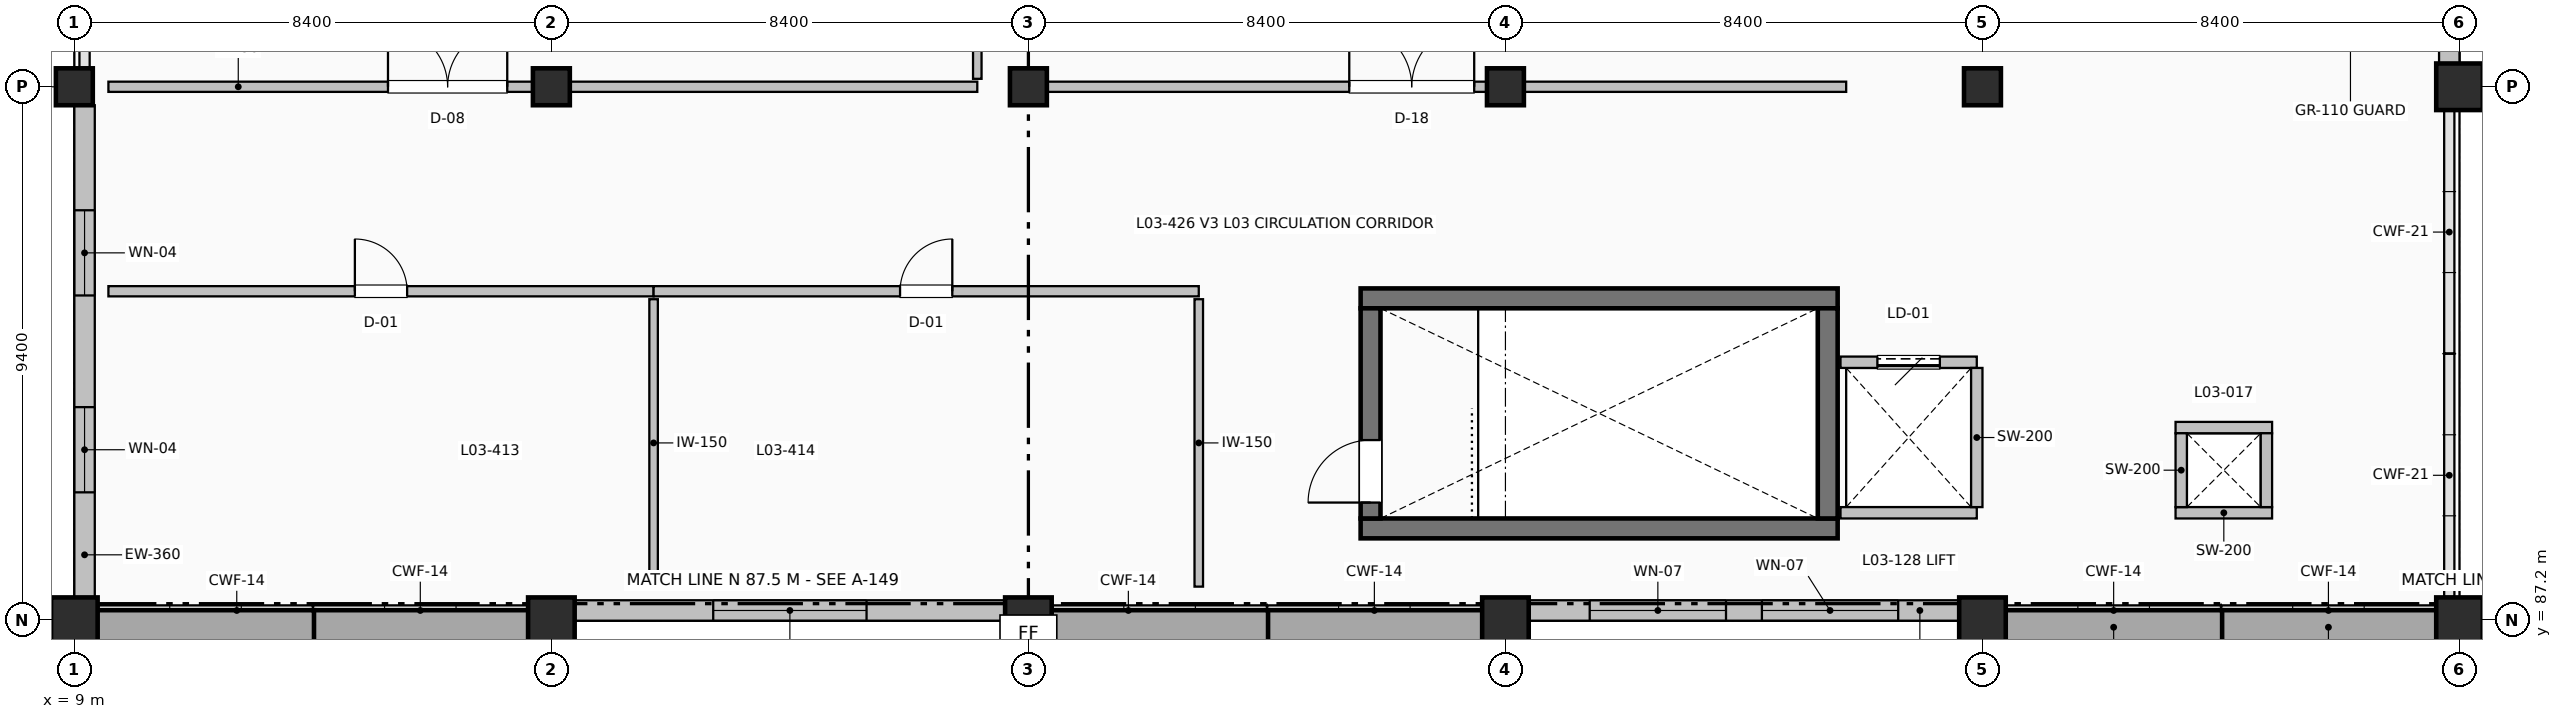
"""IFC4 building model, lengths in metres.
Left out: names, types, materials, properties, quantities, classifications, styles, units other than length and angle.
Written with IfcOpenShell. Run it as: python <this file> out.ifc"""

import sys

from ifc_helpers import new_model, si_unit, direction, frame, frame_2d, origin, origin_2d, place, context, subcontext, project, spatial, rectangle, extrude, element, fill, save


model = new_model("IFC4")
c1 = context("Model", 3, precision=1e-05, world=origin(), true_north=direction((0.0, 1.0)))
c2 = subcontext(c1, "Body", "Model", "MODEL_VIEW")
j1 = project(units=[si_unit("LENGTHUNIT", "METRE"), si_unit("PLANEANGLEUNIT", "RADIAN")], contexts=[c1])
p1 = place(None, origin())
s1 = spatial("IfcSite", under=j1, at=p1, CompositionType="ELEMENT")
p2 = place(p1, origin())
s2 = spatial("IfcBuilding", under=s1, at=p2, CompositionType="ELEMENT")
p3 = place(p2, frame((0.0, 0.0, 15.0)))
s3 = spatial("IfcBuildingStorey", under=s2, at=p3, CompositionType="ELEMENT", Elevation=15.0)
p4 = place(p3, frame((9.0, 87.2, 0.0), z_axis=(0.0, 0.0, 1.0), x_axis=(1.0, 0.0, 0.0)))
e1 = element("IfcColumn", 1, at=p4, inside=s3, PredefinedType="COLUMN", context=c2, shape_type="SweptSolid", body=[
    extrude(rectangle(XDim=0.82, YDim=0.82, at=origin_2d()), origin(), (0.0, 0.0, 1.0), 4.5),
])
p5 = place(p3, frame((9.0, 96.6, 0.0), z_axis=(0.0, 0.0, 1.0), x_axis=(1.0, 0.0, 0.0)))
e2 = element("IfcColumn", 2, at=p5, inside=s3, PredefinedType="COLUMN", context=c2, shape_type="SweptSolid", body=[
    extrude(rectangle(XDim=0.65, YDim=0.65, at=origin_2d()), origin(), (0.0, 0.0, 1.0), 4.5),
])
p6 = place(p3, frame((17.4, 87.2, 0.0), z_axis=(0.0, 0.0, 1.0), x_axis=(1.0, 0.0, 0.0)))
e3 = element("IfcColumn", 3, at=p6, inside=s3, PredefinedType="COLUMN", context=c2, shape_type="SweptSolid", body=[
    extrude(rectangle(XDim=0.82, YDim=0.82, at=origin_2d()), origin(), (0.0, 0.0, 1.0), 4.5),
])
p7 = place(p3, frame((17.4, 96.6, 0.0), z_axis=(0.0, 0.0, 1.0), x_axis=(1.0, 0.0, 0.0)))
e4 = element("IfcColumn", 4, at=p7, inside=s3, PredefinedType="COLUMN", context=c2, shape_type="SweptSolid", body=[
    extrude(rectangle(XDim=0.65, YDim=0.65, at=origin_2d()), origin(), (0.0, 0.0, 1.0), 4.5),
])
p8 = place(p3, frame((25.8, 87.2, 0.0), z_axis=(0.0, 0.0, 1.0), x_axis=(1.0, 0.0, 0.0)))
e5 = element("IfcColumn", 5, at=p8, inside=s3, PredefinedType="COLUMN", context=c2, shape_type="SweptSolid", body=[
    extrude(rectangle(XDim=0.82, YDim=0.82, at=origin_2d()), origin(), (0.0, 0.0, 1.0), 4.5),
])
p9 = place(p3, frame((25.8, 96.6, 0.0), z_axis=(0.0, 0.0, 1.0), x_axis=(1.0, 0.0, 0.0)))
e6 = element("IfcColumn", 6, at=p9, inside=s3, PredefinedType="COLUMN", context=c2, shape_type="SweptSolid", body=[
    extrude(rectangle(XDim=0.65, YDim=0.65, at=origin_2d()), origin(), (0.0, 0.0, 1.0), 4.5),
])
p10 = place(p3, frame((34.2, 87.2, 0.0), z_axis=(0.0, 0.0, 1.0), x_axis=(1.0, 0.0, 0.0)))
e7 = element("IfcColumn", 7, at=p10, inside=s3, PredefinedType="COLUMN", context=c2, shape_type="SweptSolid", body=[
    extrude(rectangle(XDim=0.82, YDim=0.82, at=origin_2d()), origin(), (0.0, 0.0, 1.0), 4.5),
])
p11 = place(p3, frame((34.2, 96.6, 0.0), z_axis=(0.0, 0.0, 1.0), x_axis=(1.0, 0.0, 0.0)))
e8 = element("IfcColumn", 8, at=p11, inside=s3, PredefinedType="COLUMN", context=c2, shape_type="SweptSolid", body=[
    extrude(rectangle(XDim=0.65, YDim=0.65, at=origin_2d()), origin(), (0.0, 0.0, 1.0), 4.5),
])
p12 = place(p3, frame((42.6, 87.2, 0.0), z_axis=(0.0, 0.0, 1.0), x_axis=(1.0, 0.0, 0.0)))
e9 = element("IfcColumn", 9, at=p12, inside=s3, PredefinedType="COLUMN", context=c2, shape_type="SweptSolid", body=[
    extrude(rectangle(XDim=0.82, YDim=0.82, at=origin_2d()), origin(), (0.0, 0.0, 1.0), 4.5),
])
p13 = place(p3, frame((42.6, 96.6, 0.0), z_axis=(0.0, 0.0, 1.0), x_axis=(1.0, 0.0, 0.0)))
e10 = element("IfcColumn", 10, at=p13, inside=s3, PredefinedType="COLUMN", context=c2, shape_type="SweptSolid", body=[
    extrude(rectangle(XDim=0.65, YDim=0.65, at=origin_2d()), origin(), (0.0, 0.0, 1.0), 4.5),
])
for number, where, z_axis, x_axis in (
    (11, (51.0, 87.2, 0.0), (0.0, 0.0, 1.0), (1.0, 0.0, 0.0)),
    (12, (51.0, 96.6, 0.0), (0.0, 0.0, 1.0), (1.0, 0.0, 0.0)),
):
    element("IfcColumn", number, at=place(p3, frame(where, z_axis=z_axis, x_axis=x_axis)), inside=s3, PredefinedType="COLUMN", context=c2, shape_type="SweptSolid", body=[
        extrude(rectangle(XDim=0.82, YDim=0.82, at=origin_2d()), origin(), (0.0, 0.0, 1.0), 4.5),
    ])
for number, where, z_axis, x_axis in (
    (13, (31.65, 88.825, 0.0), (0.0, 0.0, 1.0), (1.0, 0.0, 0.0)),
    (14, (40.05, 92.875, 0.0), (0.0, 0.0, 1.0), (-1.0, 0.0, 0.0)),
):
    element("IfcWall", number, at=place(p3, frame(where, z_axis=z_axis, x_axis=x_axis)), inside=s3, PredefinedType="SHEAR", context=c2, shape_type="SweptSolid", body=[
        extrude(rectangle(XDim=8.4, YDim=0.35, at=frame_2d((4.2, 0.0))), origin(), (0.0, 0.0, 1.0), 4.22),
    ])
p14 = place(p3, frame((31.825, 89.0, 0.0), z_axis=(0.0, 0.0, 1.0), x_axis=(0.0, 1.0, 0.0)))
e15 = element("IfcWall", 15, at=p14, inside=s3, PredefinedType="SHEAR", context=c2, shape_type="SweptSolid", body=[
    extrude(rectangle(XDim=3.7, YDim=0.35, at=frame_2d((1.85, 0.0))), origin(), (0.0, 0.0, 1.0), 4.22),
])
p15 = place(p14, frame((0.28, 0.0, 0.0)))
e16 = element("IfcOpeningElement", 16, at=p15, cuts=e15, PredefinedType="OPENING", context=c2, shape_type="SweptSolid", body=[
    extrude(rectangle(XDim=1.1, YDim=2.08, at=frame_2d((0.55, 1.04))), frame((0.0, 0.185, 0.0), z_axis=(0.0, -1.0, 0.0), x_axis=(1.0, 0.0, 0.0)), (0.0, 0.0, 1.0), 0.37),
])
p16 = place(p3, frame((39.875, 92.7, 0.0), z_axis=(0.0, 0.0, 1.0), x_axis=(0.0, -1.0, 0.0)))
e17 = element("IfcWall", 17, at=p16, inside=s3, PredefinedType="SHEAR", context=c2, shape_type="SweptSolid", body=[
    extrude(rectangle(XDim=3.7, YDim=0.35, at=frame_2d((1.85, 0.0))), origin(), (0.0, 0.0, 1.0), 4.22),
])
p17 = place(p3, frame((50.82, 105.59, 0.0), z_axis=(0.0, 0.0, 1.0), x_axis=(0.0, -1.0, 0.0)))
e18 = element("IfcWall", 18, at=p17, inside=s3, PredefinedType="SOLIDWALL", context=c2, shape_type="SweptSolid", body=[
    extrude(rectangle(XDim=8.58, YDim=0.36, at=frame_2d((4.29, 0.0))), origin(), (0.0, 0.0, 1.0), 3.709),
])
p18 = place(p17, frame((1.074, 0.0, 0.9)))
e19 = element("IfcOpeningElement", 19, at=p18, cuts=e18, PredefinedType="OPENING", context=c2, shape_type="SweptSolid", body=[
    extrude(rectangle(XDim=3.0, YDim=2.1, at=frame_2d((1.5, 1.05))), frame((0.0, 0.19, 0.0), z_axis=(0.0, -1.0, 0.0), x_axis=(1.0, 0.0, 0.0)), (0.0, 0.0, 1.0), 0.38),
])
p19 = place(p17, frame((4.506, 0.0, 0.9)))
e20 = element("IfcOpeningElement", 20, at=p19, cuts=e18, PredefinedType="OPENING", context=c2, shape_type="SweptSolid", body=[
    extrude(rectangle(XDim=3.0, YDim=2.1, at=frame_2d((1.5, 1.05))), frame((0.0, 0.19, 0.0), z_axis=(0.0, -1.0, 0.0), x_axis=(1.0, 0.0, 0.0)), (0.0, 0.0, 1.0), 0.38),
])
p20 = place(p3, frame((9.18, 87.61, 0.0), z_axis=(0.0, 0.0, 1.0), x_axis=(0.0, 1.0, 0.0)))
e21 = element("IfcWall", 21, at=p20, inside=s3, PredefinedType="SOLIDWALL", context=c2, shape_type="SweptSolid", body=[
    extrude(rectangle(XDim=8.665, YDim=0.36, at=frame_2d((4.333, 0.0))), origin(), (0.0, 0.0, 1.0), 3.709),
])
p21 = place(p20, frame((1.85, 0.0, 0.9)))
e22 = element("IfcOpeningElement", 22, at=p21, cuts=e21, PredefinedType="OPENING", context=c2, shape_type="SweptSolid", body=[
    extrude(rectangle(XDim=1.5, YDim=2.1, at=frame_2d((0.75, 1.05))), frame((0.0, 0.19, 0.0), z_axis=(0.0, -1.0, 0.0), x_axis=(1.0, 0.0, 0.0)), (0.0, 0.0, 1.0), 0.38),
])
p22 = place(p20, frame((5.316, 0.0, 0.9)))
e23 = element("IfcOpeningElement", 23, at=p22, cuts=e21, PredefinedType="OPENING", context=c2, shape_type="SweptSolid", body=[
    extrude(rectangle(XDim=1.5, YDim=2.1, at=frame_2d((0.75, 1.05))), frame((0.0, 0.19, 0.0), z_axis=(0.0, -1.0, 0.0), x_axis=(1.0, 0.0, 0.0)), (0.0, 0.0, 1.0), 0.38),
])
p23 = place(p3, frame((42.19, 87.38, 0.0), z_axis=(0.0, 0.0, 1.0), x_axis=(-1.0, 0.0, 0.0)))
e24 = element("IfcWall", 24, at=p23, inside=s3, PredefinedType="SOLIDWALL", context=c2, shape_type="SweptSolid", body=[
    extrude(rectangle(XDim=7.58, YDim=0.36, at=frame_2d((3.79, 0.0))), origin(), (0.0, 0.0, 1.0), 4.2),
])
p24 = place(p23, frame((1.074, 0.0, 0.9)))
e25 = element("IfcOpeningElement", 25, at=p24, cuts=e24, PredefinedType="OPENING", context=c2, shape_type="SweptSolid", body=[
    extrude(rectangle(XDim=2.4, YDim=2.1, at=frame_2d((1.2, 1.05))), frame((0.0, 0.19, 0.0), z_axis=(0.0, -1.0, 0.0), x_axis=(1.0, 0.0, 0.0)), (0.0, 0.0, 1.0), 0.38),
])
p25 = place(p23, frame((4.106, 0.0, 0.9)))
e26 = element("IfcOpeningElement", 26, at=p25, cuts=e24, PredefinedType="OPENING", context=c2, shape_type="SweptSolid", body=[
    extrude(rectangle(XDim=2.4, YDim=2.1, at=frame_2d((1.2, 1.05))), frame((0.0, 0.19, 0.0), z_axis=(0.0, -1.0, 0.0), x_axis=(1.0, 0.0, 0.0)), (0.0, 0.0, 1.0), 0.38),
])
p26 = place(p3, frame((25.39, 87.38, 0.0), z_axis=(0.0, 0.0, 1.0), x_axis=(-1.0, 0.0, 0.0)))
e27 = element("IfcWall", 27, at=p26, inside=s3, PredefinedType="SOLIDWALL", context=c2, shape_type="SweptSolid", body=[
    extrude(rectangle(XDim=7.58, YDim=0.36, at=frame_2d((3.79, 0.0))), origin(), (0.0, 0.0, 1.0), 4.2),
])
p27 = place(p26, frame((2.44, 0.0, 0.9)))
e28 = element("IfcOpeningElement", 28, at=p27, cuts=e27, PredefinedType="OPENING", context=c2, shape_type="SweptSolid", body=[
    extrude(rectangle(XDim=2.7, YDim=2.1, at=frame_2d((1.35, 1.05))), frame((0.0, 0.19, 0.0), z_axis=(0.0, -1.0, 0.0), x_axis=(1.0, 0.0, 0.0)), (0.0, 0.0, 1.0), 0.38),
])
for number, where, z_axis, x_axis in (
    (29, (46.0, 89.1, 0.0), (0.0, 0.0, 1.0), (1.0, 0.0, 0.0)),
    (30, (47.7, 90.6, 0.0), (0.0, 0.0, 1.0), (-1.0, 0.0, 0.0)),
):
    element("IfcWall", number, at=place(p3, frame(where, z_axis=z_axis, x_axis=x_axis)), inside=s3, PredefinedType="PARTITIONING", context=c2, shape_type="SweptSolid", body=[
        extrude(rectangle(XDim=1.7, YDim=0.2, at=frame_2d((0.85, 0.0))), origin(), (0.0, 0.0, 1.0), 4.2),
    ])
for number, where, z_axis, x_axis in (
    (31, (46.1, 89.2, 0.0), (0.0, 0.0, 1.0), (0.0, 1.0, 0.0)),
    (32, (47.6, 90.5, 0.0), (0.0, 0.0, 1.0), (0.0, -1.0, 0.0)),
):
    element("IfcWall", number, at=place(p3, frame(where, z_axis=z_axis, x_axis=x_axis)), inside=s3, PredefinedType="PARTITIONING", context=c2, shape_type="SweptSolid", body=[
        extrude(rectangle(XDim=1.3, YDim=0.2, at=frame_2d((0.65, 0.0))), origin(), (0.0, 0.0, 1.0), 4.2),
    ])
p28 = place(p3, frame((40.1, 89.1, 0.0), z_axis=(0.0, 0.0, 1.0), x_axis=(1.0, 0.0, 0.0)))
e33 = element("IfcWall", 33, at=p28, inside=s3, PredefinedType="PARTITIONING", context=c2, shape_type="SweptSolid", body=[
    extrude(rectangle(XDim=2.4, YDim=0.2, at=frame_2d((1.2, 0.0))), origin(), (0.0, 0.0, 1.0), 3.702),
])
p29 = place(p3, frame((42.5, 91.75, 0.0), z_axis=(0.0, 0.0, 1.0), x_axis=(-1.0, 0.0, 0.0)))
e34 = element("IfcWall", 34, at=p29, inside=s3, PredefinedType="PARTITIONING", context=c2, shape_type="SweptSolid", body=[
    extrude(rectangle(XDim=2.4, YDim=0.2, at=frame_2d((1.2, 0.0))), origin(), (0.0, 0.0, 1.0), 3.702),
])
p30 = place(p29, frame((0.65, 0.0, 0.0)))
e35 = element("IfcOpeningElement", 35, at=p30, cuts=e34, PredefinedType="OPENING", context=c2, shape_type="SweptSolid", body=[
    extrude(rectangle(XDim=1.1, YDim=2.15, at=frame_2d((0.55, 1.075))), frame((0.0, 0.11, 0.0), z_axis=(0.0, -1.0, 0.0), x_axis=(1.0, 0.0, 0.0)), (0.0, 0.0, 1.0), 0.22),
])
p31 = place(p3, frame((42.5, 91.65, 0.0), z_axis=(0.0, 0.0, 1.0), x_axis=(0.0, -1.0, 0.0)))
e36 = element("IfcWall", 36, at=p31, inside=s3, PredefinedType="PARTITIONING", context=c2, shape_type="SweptSolid", body=[
    extrude(rectangle(XDim=2.45, YDim=0.2, at=frame_2d((1.225, 0.0))), origin(), (0.0, 0.0, 1.0), 3.702),
])
p32 = place(p3, frame((9.6, 96.6, 0.0), z_axis=(0.0, 0.0, 1.0), x_axis=(1.0, 0.0, 0.0)))
e37 = element("IfcWall", 37, at=p32, inside=s3, PredefinedType="PARTITIONING", context=c2, shape_type="SweptSolid", body=[
    extrude(rectangle(XDim=7.475, YDim=0.18, at=frame_2d((3.737, 0.0))), origin(), (0.0, 0.0, 1.0), 4.192),
])
p33 = place(p32, frame((4.923, 0.0, 0.0)))
e38 = element("IfcOpeningElement", 38, at=p33, cuts=e37, PredefinedType="OPENING", context=c2, shape_type="SweptSolid", body=[
    extrude(rectangle(XDim=2.1, YDim=2.25, at=frame_2d((1.05, 1.125))), frame((0.0, 0.1, 0.0), z_axis=(0.0, -1.0, 0.0), x_axis=(1.0, 0.0, 0.0)), (0.0, 0.0, 1.0), 0.2),
])
p34 = place(p3, frame((17.725, 96.6, 0.0), z_axis=(0.0, 0.0, 1.0), x_axis=(1.0, 0.0, 0.0)))
e39 = element("IfcWall", 39, at=p34, inside=s3, PredefinedType="PARTITIONING", context=c2, shape_type="SweptSolid", body=[
    extrude(rectangle(XDim=7.175, YDim=0.18, at=frame_2d((3.587, 0.0))), origin(), (0.0, 0.0, 1.0), 4.192),
])
p35 = place(p3, frame((24.9, 96.74, 0.0), z_axis=(0.0, 0.0, 1.0), x_axis=(0.0, 1.0, 0.0)))
e40 = element("IfcWall", 40, at=p35, inside=s3, PredefinedType="PARTITIONING", context=c2, shape_type="SweptSolid", body=[
    extrude(rectangle(XDim=27.66, YDim=0.15, at=frame_2d((13.83, 0.0))), origin(), (0.0, 0.0, 1.0), 4.192),
])
p36 = place(p3, frame((26.125, 96.6, 0.0), z_axis=(0.0, 0.0, 1.0), x_axis=(1.0, 0.0, 0.0)))
e41 = element("IfcWall", 41, at=p36, inside=s3, PredefinedType="PARTITIONING", context=c2, shape_type="SweptSolid", body=[
    extrude(rectangle(XDim=7.75, YDim=0.18, at=frame_2d((3.875, 0.0))), origin(), (0.0, 0.0, 1.0), 4.192),
])
p37 = place(p36, frame((5.325, 0.0, 0.0)))
e42 = element("IfcOpeningElement", 42, at=p37, cuts=e41, PredefinedType="OPENING", context=c2, shape_type="SweptSolid", body=[
    extrude(rectangle(XDim=2.2, YDim=2.32, at=frame_2d((1.1, 1.16))), frame((0.0, 0.1, 0.0), z_axis=(0.0, -1.0, 0.0), x_axis=(1.0, 0.0, 0.0)), (0.0, 0.0, 1.0), 0.2),
])
p38 = place(p3, frame((34.525, 96.6, 0.0), z_axis=(0.0, 0.0, 1.0), x_axis=(1.0, 0.0, 0.0)))
e43 = element("IfcWall", 43, at=p38, inside=s3, PredefinedType="PARTITIONING", context=c2, shape_type="SweptSolid", body=[
    extrude(rectangle(XDim=5.675, YDim=0.18, at=frame_2d((2.837, 0.0))), origin(), (0.0, 0.0, 1.0), 4.192),
])
p39 = place(p3, frame((9.6, 93.0, 0.0), z_axis=(0.0, 0.0, 1.0), x_axis=(1.0, 0.0, 0.0)))
e44 = element("IfcWall", 44, at=p39, inside=s3, PredefinedType="PARTITIONING", context=c2, shape_type="SweptSolid", body=[
    extrude(rectangle(XDim=9.6, YDim=0.18, at=frame_2d((4.8, 0.0))), origin(), (0.0, 0.0, 1.0), 3.702),
])
p40 = place(p39, frame((4.34, 0.0, 0.0)))
e45 = element("IfcOpeningElement", 45, at=p40, cuts=e44, PredefinedType="OPENING", context=c2, shape_type="SweptSolid", body=[
    extrude(rectangle(XDim=0.92, YDim=2.05, at=frame_2d((0.46, 1.025))), frame((0.0, 0.1, 0.0), z_axis=(0.0, -1.0, 0.0), x_axis=(1.0, 0.0, 0.0)), (0.0, 0.0, 1.0), 0.2),
])
for number, where, z_axis, x_axis in (
    (46, (19.2, 87.8, 0.0), (0.0, 0.0, 1.0), (0.0, 1.0, 0.0)),
    (47, (28.8, 87.8, 0.0), (0.0, 0.0, 1.0), (0.0, 1.0, 0.0)),
):
    element("IfcWall", number, at=place(p3, frame(where, z_axis=z_axis, x_axis=x_axis)), inside=s3, PredefinedType="PARTITIONING", context=c2, shape_type="SweptSolid", body=[
        extrude(rectangle(XDim=5.06, YDim=0.15, at=frame_2d((2.53, 0.0))), origin(), (0.0, 0.0, 1.0), 4.192),
    ])
p41 = place(p3, frame((19.2, 93.0, 0.0), z_axis=(0.0, 0.0, 1.0), x_axis=(1.0, 0.0, 0.0)))
e48 = element("IfcWall", 48, at=p41, inside=s3, PredefinedType="PARTITIONING", context=c2, shape_type="SweptSolid", body=[
    extrude(rectangle(XDim=9.6, YDim=0.18, at=frame_2d((4.8, 0.0))), origin(), (0.0, 0.0, 1.0), 3.702),
])
p42 = place(p41, frame((4.34, 0.0, 0.0)))
e49 = element("IfcOpeningElement", 49, at=p42, cuts=e48, PredefinedType="OPENING", context=c2, shape_type="SweptSolid", body=[
    extrude(rectangle(XDim=0.92, YDim=2.05, at=frame_2d((0.46, 1.025))), frame((0.0, 0.1, 0.0), z_axis=(0.0, -1.0, 0.0), x_axis=(1.0, 0.0, 0.0)), (0.0, 0.0, 1.0), 0.2),
])
p43 = place(p21, origin())
e50 = element("IfcWindow", 50, at=p43, inside=s3, PartitioningType="SINGLE_PANEL", PredefinedType="WINDOW", context=c2, shape_type="SweptSolid", body=[
    extrude(rectangle(XDim=1.5, YDim=2.1, at=frame_2d((0.75, 1.05))), frame((0.0, 0.03, 0.0), z_axis=(0.0, -1.0, 0.0), x_axis=(1.0, 0.0, 0.0)), (0.0, 0.0, 1.0), 0.06),
])
fill(e22, e50)
p44 = place(p22, origin())
e51 = element("IfcWindow", 51, at=p44, inside=s3, PartitioningType="SINGLE_PANEL", PredefinedType="WINDOW", context=c2, shape_type="SweptSolid", body=[
    extrude(rectangle(XDim=1.5, YDim=2.1, at=frame_2d((0.75, 1.05))), frame((0.0, 0.03, 0.0), z_axis=(0.0, -1.0, 0.0), x_axis=(1.0, 0.0, 0.0)), (0.0, 0.0, 1.0), 0.06),
])
fill(e23, e51)
p45 = place(p24, origin())
e52 = element("IfcWindow", 52, at=p45, inside=s3, PartitioningType="SINGLE_PANEL", PredefinedType="WINDOW", context=c2, shape_type="SweptSolid", body=[
    extrude(rectangle(XDim=2.4, YDim=2.1, at=frame_2d((1.2, 1.05))), frame((0.0, 0.03, 0.0), z_axis=(0.0, -1.0, 0.0), x_axis=(1.0, 0.0, 0.0)), (0.0, 0.0, 1.0), 0.06),
])
fill(e25, e52)
p46 = place(p25, origin())
e53 = element("IfcWindow", 53, at=p46, inside=s3, PartitioningType="SINGLE_PANEL", PredefinedType="WINDOW", context=c2, shape_type="SweptSolid", body=[
    extrude(rectangle(XDim=2.4, YDim=2.1, at=frame_2d((1.2, 1.05))), frame((0.0, 0.03, 0.0), z_axis=(0.0, -1.0, 0.0), x_axis=(1.0, 0.0, 0.0)), (0.0, 0.0, 1.0), 0.06),
])
fill(e26, e53)
p47 = place(p27, origin())
e54 = element("IfcWindow", 54, at=p47, inside=s3, PartitioningType="SINGLE_PANEL", PredefinedType="WINDOW", context=c2, shape_type="SweptSolid", body=[
    extrude(rectangle(XDim=2.7, YDim=2.1, at=frame_2d((1.35, 1.05))), frame((0.0, 0.03, 0.0), z_axis=(0.0, -1.0, 0.0), x_axis=(1.0, 0.0, 0.0)), (0.0, 0.0, 1.0), 0.06),
])
fill(e28, e54)
p48 = place(p15, origin())
e55 = element("IfcDoor", 55, at=p48, inside=s3, OperationType="SINGLE_SWING_LEFT", PredefinedType="DOOR", context=c2, shape_type="SweptSolid", body=[
    extrude(rectangle(XDim=1.1, YDim=2.08, at=frame_2d((0.55, 1.04))), frame((0.0, 0.025, 0.0), z_axis=(0.0, -1.0, 0.0), x_axis=(1.0, 0.0, 0.0)), (0.0, 0.0, 1.0), 0.05),
])
fill(e16, e55)
p49 = place(p30, origin())
e56 = element("IfcDoor", 56, at=p49, inside=s3, OperationType="SLIDING_TO_LEFT", PredefinedType="DOOR", context=c2, shape_type="SweptSolid", body=[
    extrude(rectangle(XDim=1.1, YDim=2.15, at=frame_2d((0.55, 1.075))), frame((0.0, 0.025, 0.0), z_axis=(0.0, -1.0, 0.0), x_axis=(1.0, 0.0, 0.0)), (0.0, 0.0, 1.0), 0.05),
])
fill(e35, e56)
p50 = place(p33, origin())
e57 = element("IfcDoor", 57, at=p50, inside=s3, OperationType="DOUBLE_DOOR_SINGLE_SWING", PredefinedType="DOOR", context=c2, shape_type="SweptSolid", body=[
    extrude(rectangle(XDim=2.1, YDim=2.25, at=frame_2d((1.05, 1.125))), frame((0.0, 0.025, 0.0), z_axis=(0.0, -1.0, 0.0), x_axis=(1.0, 0.0, 0.0)), (0.0, 0.0, 1.0), 0.05),
])
fill(e38, e57)
p51 = place(p37, origin())
e58 = element("IfcDoor", 58, at=p51, inside=s3, OperationType="DOUBLE_DOOR_SINGLE_SWING", PredefinedType="DOOR", context=c2, shape_type="SweptSolid", body=[
    extrude(rectangle(XDim=2.2, YDim=2.32, at=frame_2d((1.1, 1.16))), frame((0.0, 0.025, 0.0), z_axis=(0.0, -1.0, 0.0), x_axis=(1.0, 0.0, 0.0)), (0.0, 0.0, 1.0), 0.05),
])
fill(e42, e58)
p52 = place(p40, origin())
e59 = element("IfcDoor", 59, at=p52, inside=s3, OperationType="SINGLE_SWING_LEFT", PredefinedType="DOOR", context=c2, shape_type="SweptSolid", body=[
    extrude(rectangle(XDim=0.92, YDim=2.05, at=frame_2d((0.46, 1.025))), frame((0.0, 0.025, 0.0), z_axis=(0.0, -1.0, 0.0), x_axis=(1.0, 0.0, 0.0)), (0.0, 0.0, 1.0), 0.05),
])
fill(e45, e59)
p53 = place(p42, origin())
e60 = element("IfcDoor", 60, at=p53, inside=s3, OperationType="SINGLE_SWING_RIGHT", PredefinedType="DOOR", context=c2, shape_type="SweptSolid", body=[
    extrude(rectangle(XDim=0.92, YDim=2.05, at=frame_2d((0.46, 1.025))), frame((0.0, 0.025, 0.0), z_axis=(0.0, -1.0, 0.0), x_axis=(1.0, 0.0, 0.0)), (0.0, 0.0, 1.0), 0.05),
])
fill(e49, e60)
save(model, sys.argv[1])
